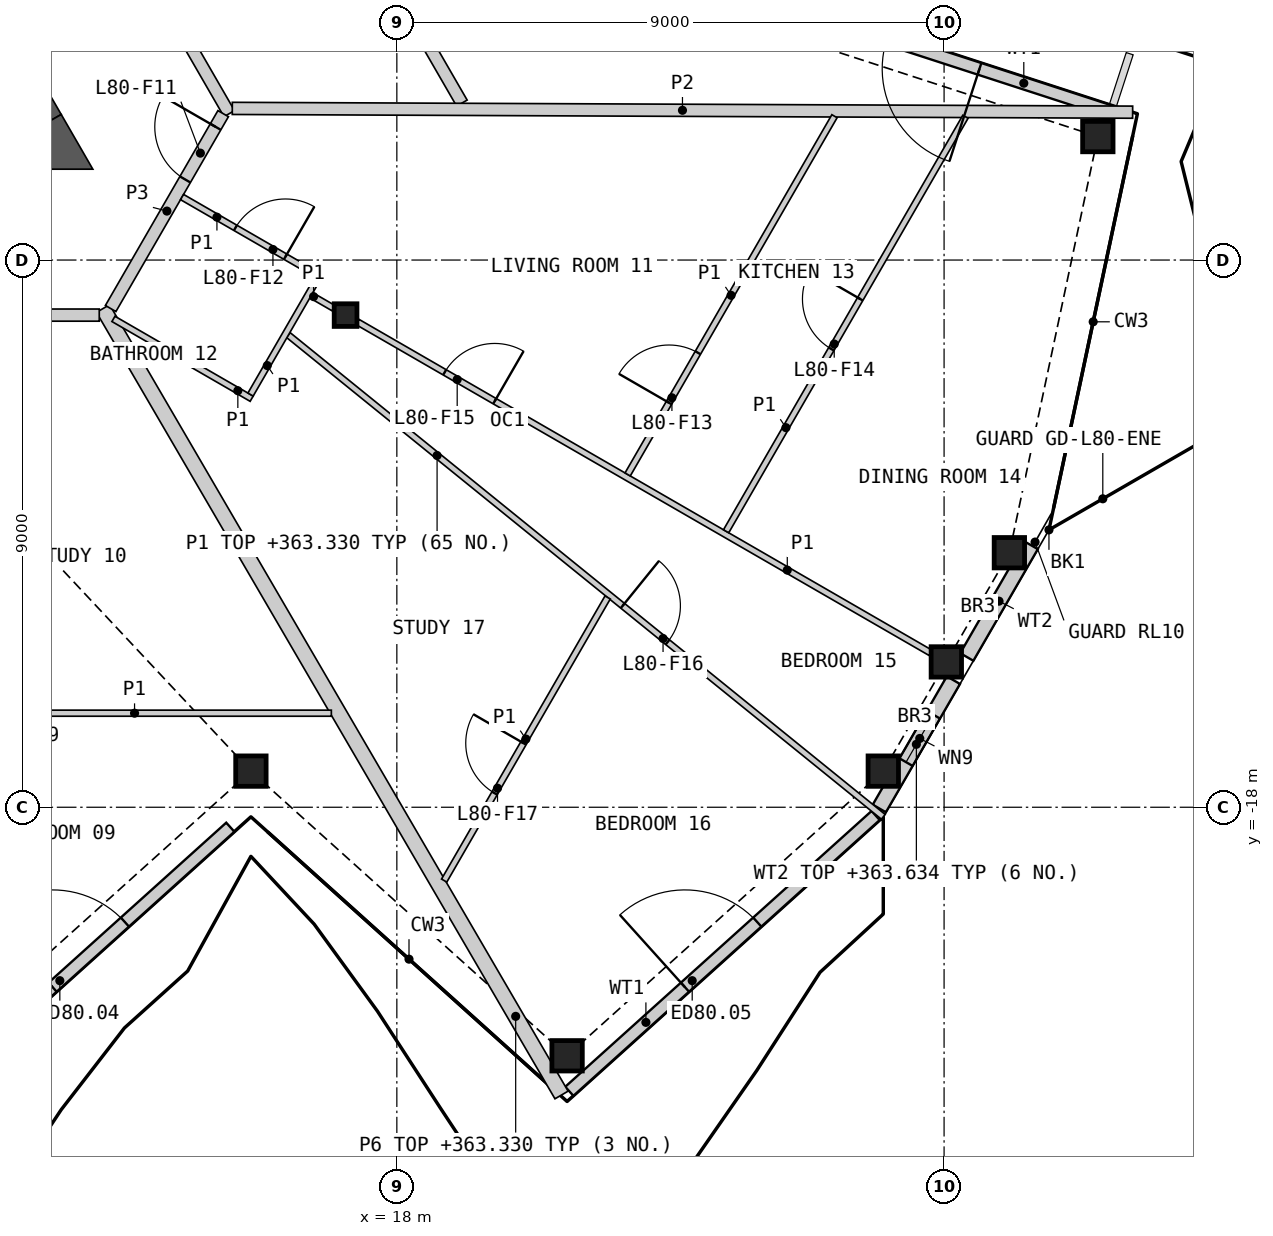
"""IFC4 building model, lengths in metres.
Left out: names, types, materials, properties, quantities, classifications, styles, units other than length and angle.
Written with IfcOpenShell. Run it as: python <this file> out.ifc"""

import sys

from ifc_helpers import new_model, si_unit, direction, frame, frame_2d, origin, origin_2d, place, context, subcontext, project, spatial, polyline, rectangle, hollow_rectangle, i_section, outline, extrude, element, fill, save


model = new_model("IFC4")
c1 = context("Model", 3, precision=1e-05, world=origin(), true_north=direction((0.0, 1.0)))
c2 = subcontext(c1, "Body", "Model", "MODEL_VIEW")
j1 = project(units=[si_unit("LENGTHUNIT", "METRE"), si_unit("PLANEANGLEUNIT", "RADIAN")], contexts=[c1])
p1 = place(None, origin())
s1 = spatial("IfcSite", under=j1, at=p1, CompositionType="ELEMENT")
p2 = place(p1, origin())
s2 = spatial("IfcBuilding", under=s1, at=p2, CompositionType="ELEMENT")
p3 = place(p2, frame((0.0, 0.0, 361.0)))
s3 = spatial("IfcBuildingStorey", under=s2, at=p3, CompositionType="ELEMENT", Elevation=361.0)
for number, where, z_axis, x_axis in (
    (1, (15.6, -17.406, 0.0), (0.0, 0.0, 1.0), (1.0, 0.0, 0.0)),
    (2, (20.8, -22.088, 0.0), (0.0, 0.0, 1.0), (1.0, 0.0, 0.0)),
    (3, (26.0, -17.406, 0.0), (0.0, 0.0, 1.0), (1.0, 0.0, 0.0)),
    (4, (27.037, -15.61, 0.0), (0.0, 0.0, 1.0), (1.0, 0.0, 0.0)),
    (5, (28.074, -13.814, 0.0), (0.0, 0.0, 1.0), (1.0, 0.0, 0.0)),
    (6, (29.529, -6.969, 0.0), (0.0, 0.0, 1.0), (1.0, 0.0, 0.0)),
):
    element("IfcColumn", number, at=place(p3, frame(where, z_axis=z_axis, x_axis=x_axis)), inside=s3, PredefinedType="COLUMN", context=c2, shape_type="SweptSolid", body=[
        extrude(hollow_rectangle(XDim=0.5, YDim=0.5, WallThickness=0.03, at=origin_2d()), origin(), (0.0, 0.0, 1.0), 3.4),
    ])
p4 = place(p3, frame((17.157, -9.906, 0.0), z_axis=(0.0, 0.0, 1.0), x_axis=(1.0, 0.0, 0.0)))
e7 = element("IfcColumn", 7, at=p4, inside=s3, PredefinedType="COLUMN", context=c2, shape_type="SweptSolid", body=[
    extrude(i_section(OverallWidth=0.374, OverallDepth=0.372, WebThickness=0.016, FlangeThickness=0.026, at=origin_2d()), origin(), (0.0, 0.0, 1.0), 3.4),
])
p5 = place(p3, frame((10.503, -22.612, 0.0), z_axis=(0.0, 0.0, 1.0), x_axis=(0.743148117717, 0.669126949939, 0.0)))
e8 = element("IfcWall", 8, at=p5, inside=s3, PredefinedType="SOLIDWALL", context=c2, shape_type="SweptSolid", body=[
    extrude(rectangle(XDim=6.402, YDim=0.2, at=frame_2d((3.201, 0.0))), origin(), (0.0, 0.0, 1.0), 2.634),
])
p6 = place(p5, frame((2.469, 0.0, 0.0)))
e9 = element("IfcOpeningElement", 9, at=p6, cuts=e8, PredefinedType="OPENING", context=c2, shape_type="SweptSolid", body=[
    extrude(rectangle(XDim=1.6, YDim=2.25, at=frame_2d((0.8, 1.125))), frame((0.0, 0.11, 0.0), z_axis=(0.0, -1.0, 0.0), x_axis=(1.0, 0.0, 0.0)), (0.0, 0.0, 1.0), 0.22),
])
p7 = place(p3, frame((20.837, -22.672, 0.0), z_axis=(0.0, 0.0, 1.0), x_axis=(0.743143698099, 0.669131858437, 0.0)))
e10 = element("IfcWall", 10, at=p7, inside=s3, PredefinedType="SOLIDWALL", context=c2, shape_type="SweptSolid", body=[
    extrude(rectangle(XDim=6.779, YDim=0.2, at=frame_2d((3.389, 0.0))), origin(), (0.0, 0.0, 1.0), 2.634),
])
p8 = place(p7, frame((2.559, 0.0, 0.0)))
e11 = element("IfcOpeningElement", 11, at=p8, cuts=e10, PredefinedType="OPENING", context=c2, shape_type="SweptSolid", body=[
    extrude(rectangle(XDim=1.6, YDim=2.25, at=frame_2d((0.8, 1.125))), frame((0.0, 0.11, 0.0), z_axis=(0.0, -1.0, 0.0), x_axis=(1.0, 0.0, 0.0)), (0.0, 0.0, 1.0), 0.22),
])
p9 = place(p3, frame((25.935, -18.02, 0.0), z_axis=(0.0, 0.0, 1.0), x_axis=(0.500028873844, 0.866008732821, 0.0)))
e12 = element("IfcWall", 12, at=p9, inside=s3, PredefinedType="SOLIDWALL", context=c2, shape_type="SweptSolid", body=[
    extrude(rectangle(XDim=2.437, YDim=0.25, at=frame_2d((1.218, 0.0))), origin(), (0.0, 0.0, 1.0), 2.634),
])
p10 = place(p9, frame((0.88, 0.0, 0.6)))
e13 = element("IfcOpeningElement", 13, at=p10, cuts=e12, PredefinedType="OPENING", context=c2, shape_type="SweptSolid", body=[
    extrude(rectangle(XDim=0.9, YDim=1.8, at=frame_2d((0.45, 0.9))), frame((0.0, 0.135, 0.0), z_axis=(0.0, -1.0, 0.0), x_axis=(1.0, 0.0, 0.0)), (0.0, 0.0, 1.0), 0.27),
])
p11 = place(p3, frame((27.374, -15.528, 0.0), z_axis=(0.0, 0.0, 1.0), x_axis=(0.499941779639, 0.866059014716, 0.0)))
e14 = element("IfcWall", 14, at=p11, inside=s3, PredefinedType="SOLIDWALL", context=c2, shape_type="SweptSolid", body=[
    extrude(rectangle(XDim=2.12, YDim=0.25, at=frame_2d((1.06, 0.0))), origin(), (0.0, 0.0, 1.0), 2.634),
])
p12 = place(p3, frame((29.801, -6.576, 0.0), z_axis=(0.0, 0.0, 1.0), x_axis=(-0.951060123915, 0.309005891041, 0.0)))
e15 = element("IfcWall", 15, at=p12, inside=s3, PredefinedType="SOLIDWALL", context=c2, shape_type="SweptSolid", body=[
    extrude(rectangle(XDim=6.265, YDim=0.2, at=frame_2d((3.133, 0.0))), origin(), (0.0, 0.0, 1.0), 2.634),
])
p13 = place(p12, frame((2.333, 0.0, 0.0)))
e16 = element("IfcOpeningElement", 16, at=p13, cuts=e15, PredefinedType="OPENING", context=c2, shape_type="SweptSolid", body=[
    extrude(rectangle(XDim=1.6, YDim=2.25, at=frame_2d((0.8, 1.125))), frame((0.0, 0.11, 0.0), z_axis=(0.0, -1.0, 0.0), x_axis=(1.0, 0.0, 0.0)), (0.0, 0.0, 1.0), 0.22),
])
p14 = place(p3, frame((12.221, -6.756, 0.0), z_axis=(0.0, 0.0, 1.0), x_axis=(-0.50000604952, 0.866021911064, 0.0)))
e17 = element("IfcWall", 17, at=p14, inside=s3, PredefinedType="SHEAR", context=c2, shape_type="SweptSolid", body=[
    extrude(rectangle(XDim=4.869, YDim=0.6, at=frame_2d((2.434, 0.0))), origin(), (0.0, 0.0, 1.0), 3.1),
])
p15 = place(p3, origin())
e18 = element("IfcWall", 18, at=p15, inside=s3, PredefinedType="SHEAR", context=c2, shape_type="SweptSolid", body=[
    extrude(outline(polyline([(11.961, -7.506), (11.961, -6.906), (12.48, -6.606), (13.0, -7.506), (11.961, -7.506)])), origin(), (0.0, 0.0, 1.0), 3.1),
])
p16 = place(p3, frame((13.168, -9.798, 0.0), z_axis=(0.0, 0.0, 1.0), x_axis=(0.503632750219, -0.863917850786, 0.0)))
e19 = element("IfcWall", 19, at=p16, inside=s3, PredefinedType="PARTITIONING", context=c2, shape_type="SweptSolid", body=[
    extrude(rectangle(XDim=14.972, YDim=0.25, at=frame_2d((7.486, 0.0))), origin(), (0.0, 0.0, 1.0), 2.33),
])
p17 = place(p3, frame((8.775, -9.906, 0.0), z_axis=(0.0, 0.0, 1.0), x_axis=(1.0, 0.0, 0.0)))
e20 = element("IfcWall", 20, at=p17, inside=s3, PredefinedType="PARTITIONING", context=c2, shape_type="SweptSolid", body=[
    extrude(rectangle(XDim=4.331, YDim=0.2, at=frame_2d((2.165, 0.0))), origin(), (0.0, 0.0, 1.0), 3.1),
])
p18 = place(p3, frame((12.981, -2.673, 0.0), z_axis=(0.0, 0.0, 1.0), x_axis=(0.499974648164, -0.866040040179, 0.0)))
e21 = element("IfcWall", 21, at=p18, inside=s3, PredefinedType="PARTITIONING", context=c2, shape_type="SweptSolid", body=[
    extrude(rectangle(XDim=4.525, YDim=0.2, at=frame_2d((2.263, 0.0))), origin(), (0.0, 0.0, 1.0), 3.1),
])
p19 = place(p3, frame((13.293, -9.797, 0.0), z_axis=(0.0, 0.0, 1.0), x_axis=(0.499977520935, 0.86603838169, 0.0)))
e22 = element("IfcWall", 22, at=p19, inside=s3, PredefinedType="PARTITIONING", context=c2, shape_type="SweptSolid", body=[
    extrude(rectangle(XDim=3.701, YDim=0.2, at=frame_2d((1.851, 0.0))), origin(), (0.0, 0.0, 1.0), 3.1),
])
p20 = place(p19, frame((2.451, 0.0, 0.0)))
e23 = element("IfcOpeningElement", 23, at=p20, cuts=e22, PredefinedType="OPENING", context=c2, shape_type="SweptSolid", body=[
    extrude(rectangle(XDim=1.0, YDim=2.1, at=frame_2d((0.5, 1.05))), frame((0.0, 0.11, 0.0), z_axis=(0.0, -1.0, 0.0), x_axis=(1.0, 0.0, 0.0)), (0.0, 0.0, 1.0), 0.22),
])
p21 = place(p3, frame((11.573, 6.566, 0.0), z_axis=(0.0, 0.0, 1.0), x_axis=(0.499993542657, -0.866029131901, 0.0)))
e24 = element("IfcWall", 24, at=p21, inside=s3, PredefinedType="PARTITIONING", context=c2, shape_type="SweptSolid", body=[
    extrude(rectangle(XDim=14.994, YDim=0.2, at=frame_2d((7.497, 0.0))), origin(), (0.0, 0.0, 1.0), 2.33),
])
p22 = place(p21, frame((5.166, 0.0, 0.0)))
e25 = element("IfcOpeningElement", 25, at=p22, cuts=e24, PredefinedType="OPENING", context=c2, shape_type="SweptSolid", body=[
    extrude(rectangle(XDim=0.95, YDim=2.1, at=frame_2d((0.475, 1.05))), frame((0.0, 0.11, 0.0), z_axis=(0.0, -1.0, 0.0), x_axis=(1.0, 0.0, 0.0)), (0.0, 0.0, 1.0), 0.22),
])
p23 = place(p3, frame((15.294, -6.506, 0.0), z_axis=(0.0, 0.0, 1.0), x_axis=(0.99999116141, -0.004204414611, 0.0)))
e26 = element("IfcWall", 26, at=p23, inside=s3, PredefinedType="PARTITIONING", context=c2, shape_type="SweptSolid", body=[
    extrude(rectangle(XDim=14.807, YDim=0.2, at=frame_2d((7.404, 0.0))), origin(), (0.0, 0.0, 1.0), 2.33),
])
p24 = place(p3, frame((16.216, -10.234, 0.0), z_axis=(0.0, 0.0, 1.0), x_axis=(0.777145059662, -0.629321504672, 0.0)))
e27 = element("IfcWall", 27, at=p24, inside=s3, PredefinedType="PARTITIONING", context=c2, shape_type="SweptSolid", body=[
    extrude(rectangle(XDim=12.59, YDim=0.1, at=frame_2d((6.295, 0.0))), origin(), (0.0, 0.0, 1.0), 2.33),
])
p25 = place(p24, frame((7.074, 0.0, 0.0)))
e28 = element("IfcOpeningElement", 28, at=p25, cuts=e27, PredefinedType="OPENING", context=c2, shape_type="SweptSolid", body=[
    extrude(rectangle(XDim=0.95, YDim=2.1, at=frame_2d((0.475, 1.05))), frame((0.0, 0.06, 0.0), z_axis=(0.0, -1.0, 0.0), x_axis=(1.0, 0.0, 0.0)), (0.0, 0.0, 1.0), 0.12),
])
p26 = place(p3, frame((17.354, -10.019, 0.0), z_axis=(0.0, 0.0, 1.0), x_axis=(0.866019680922, -0.500009912158, 0.0)))
e29 = element("IfcWall", 29, at=p26, inside=s3, PredefinedType="PARTITIONING", context=c2, shape_type="SweptSolid", body=[
    extrude(rectangle(XDim=10.881, YDim=0.1, at=frame_2d((5.44, 0.0))), origin(), (0.0, 0.0, 1.0), 2.33),
])
p27 = place(p26, frame((1.655, 0.0, 0.0)))
e30 = element("IfcOpeningElement", 30, at=p27, cuts=e29, PredefinedType="OPENING", context=c2, shape_type="SweptSolid", body=[
    extrude(rectangle(XDim=0.95, YDim=2.1, at=frame_2d((0.475, 1.05))), frame((0.0, 0.06, 0.0), z_axis=(0.0, -1.0, 0.0), x_axis=(1.0, 0.0, 0.0)), (0.0, 0.0, 1.0), 0.12),
])
p28 = place(p3, frame((23.415, -13.461, 0.0), z_axis=(0.0, 0.0, 1.0), x_axis=(0.500011483804, 0.866018773506, 0.0)))
e31 = element("IfcWall", 31, at=p28, inside=s3, PredefinedType="PARTITIONING", context=c2, shape_type="SweptSolid", body=[
    extrude(rectangle(XDim=7.872, YDim=0.1, at=frame_2d((3.936, 0.0))), origin(), (0.0, 0.0, 1.0), 2.33),
])
p29 = place(p28, frame((3.461, 0.0, 0.0)))
e32 = element("IfcOpeningElement", 32, at=p29, cuts=e31, PredefinedType="OPENING", context=c2, shape_type="SweptSolid", body=[
    extrude(rectangle(XDim=0.95, YDim=2.1, at=frame_2d((0.475, 1.05))), frame((0.0, 0.06, 0.0), z_axis=(0.0, -1.0, 0.0), x_axis=(1.0, 0.0, 0.0)), (0.0, 0.0, 1.0), 0.12),
])
p30 = place(p3, frame((21.796, -12.526, 0.0), z_axis=(0.0, 0.0, 1.0), x_axis=(0.499994777381, 0.866028419044, 0.0)))
e33 = element("IfcWall", 33, at=p30, inside=s3, PredefinedType="PARTITIONING", context=c2, shape_type="SweptSolid", body=[
    extrude(rectangle(XDim=6.803, YDim=0.1, at=frame_2d((3.402, 0.0))), origin(), (0.0, 0.0, 1.0), 2.33),
])
p31 = place(p30, frame((1.361, 0.0, 0.0)))
e34 = element("IfcOpeningElement", 34, at=p31, cuts=e33, PredefinedType="OPENING", context=c2, shape_type="SweptSolid", body=[
    extrude(rectangle(XDim=0.95, YDim=2.1, at=frame_2d((0.475, 1.05))), frame((0.0, 0.06, 0.0), z_axis=(0.0, -1.0, 0.0), x_axis=(1.0, 0.0, 0.0)), (0.0, 0.0, 1.0), 0.12),
])
p32 = place(p3, frame((10.45, -16.453, 0.0), z_axis=(0.0, 0.0, 1.0), x_axis=(1.0, 0.0, 0.0)))
e35 = element("IfcWall", 35, at=p32, inside=s3, PredefinedType="PARTITIONING", context=c2, shape_type="SweptSolid", body=[
    extrude(rectangle(XDim=6.473, YDim=0.1, at=frame_2d((3.236, 0.0))), origin(), (0.0, 0.0, 1.0), 2.33),
])
p33 = place(p32, frame((0.853, 0.0, 0.0)))
e36 = element("IfcOpeningElement", 36, at=p33, cuts=e35, PredefinedType="OPENING", context=c2, shape_type="SweptSolid", body=[
    extrude(rectangle(XDim=0.95, YDim=2.1, at=frame_2d((0.475, 1.05))), frame((0.0, 0.06, 0.0), z_axis=(0.0, -1.0, 0.0), x_axis=(1.0, 0.0, 0.0)), (0.0, 0.0, 1.0), 0.12),
])
p34 = place(p3, frame((18.778, -19.206, 0.0), z_axis=(0.0, 0.0, 1.0), x_axis=(0.499992359988, 0.866029814703, 0.0)))
e37 = element("IfcWall", 37, at=p34, inside=s3, PredefinedType="PARTITIONING", context=c2, shape_type="SweptSolid", body=[
    extrude(rectangle(XDim=5.376, YDim=0.1, at=frame_2d((2.688, 0.0))), origin(), (0.0, 0.0, 1.0), 2.33),
])
p35 = place(p34, frame((1.659, 0.0, 0.0)))
e38 = element("IfcOpeningElement", 38, at=p35, cuts=e37, PredefinedType="OPENING", context=c2, shape_type="SweptSolid", body=[
    extrude(rectangle(XDim=0.95, YDim=2.1, at=frame_2d((0.475, 1.05))), frame((0.0, 0.06, 0.0), z_axis=(0.0, -1.0, 0.0), x_axis=(1.0, 0.0, 0.0)), (0.0, 0.0, 1.0), 0.12),
])
p36 = place(p3, frame((14.467, -7.964, 0.0), z_axis=(0.0, 0.0, 1.0), x_axis=(0.86601223543, -0.500022807565, 0.0)))
e39 = element("IfcWall", 39, at=p36, inside=s3, PredefinedType="PARTITIONING", context=c2, shape_type="SweptSolid", body=[
    extrude(rectangle(XDim=2.65, YDim=0.1, at=frame_2d((1.325, 0.0))), origin(), (0.0, 0.0, 1.0), 2.33),
])
p37 = place(p36, frame((1.014, 0.0, 0.0)))
e40 = element("IfcOpeningElement", 40, at=p37, cuts=e39, PredefinedType="OPENING", context=c2, shape_type="SweptSolid", body=[
    extrude(rectangle(XDim=0.95, YDim=2.1, at=frame_2d((0.475, 1.05))), frame((0.0, 0.06, 0.0), z_axis=(0.0, -1.0, 0.0), x_axis=(1.0, 0.0, 0.0)), (0.0, 0.0, 1.0), 0.12),
])
p38 = place(p3, frame((13.339, -9.968, 0.0), z_axis=(0.0, 0.0, 1.0), x_axis=(0.866013657776, -0.500020344131, 0.0)))
e41 = element("IfcWall", 41, at=p38, inside=s3, PredefinedType="PARTITIONING", context=c2, shape_type="SweptSolid", body=[
    extrude(rectangle(XDim=2.625, YDim=0.1, at=frame_2d((1.312, 0.0))), origin(), (0.0, 0.0, 1.0), 2.33),
])
p39 = place(p3, frame((15.594, -11.212, 0.0), z_axis=(0.0, 0.0, 1.0), x_axis=(0.499981787252, 0.866035918664, 0.0)))
e42 = element("IfcWall", 42, at=p39, inside=s3, PredefinedType="PARTITIONING", context=c2, shape_type="SweptSolid", body=[
    extrude(rectangle(XDim=2.2, YDim=0.1, at=frame_2d((1.1, 0.0))), origin(), (0.0, 0.0, 1.0), 2.33),
])
p40 = place(p3, frame((16.594, -9.581, 0.0), z_axis=(0.0, 0.0, 1.0), x_axis=(0.866137484628, -0.499805820016, 0.0)))
e43 = element("IfcWall", 43, at=p40, inside=s3, PredefinedType="PARTITIONING", context=c2, shape_type="SweptSolid", body=[
    extrude(rectangle(XDim=0.423, YDim=0.1, at=frame_2d((0.211, 0.0))), origin(), (0.0, 0.0, 1.0), 2.33),
])
p41 = place(p6, origin())
e44 = element("IfcDoor", 44, at=p41, inside=s3, OperationType="DOUBLE_DOOR_SINGLE_SWING", PredefinedType="DOOR", context=c2, shape_type="SweptSolid", body=[
    extrude(rectangle(XDim=1.6, YDim=2.25, at=frame_2d((0.8, 1.125))), frame((0.0, 0.025, 0.0), z_axis=(0.0, -1.0, 0.0), x_axis=(1.0, 0.0, 0.0)), (0.0, 0.0, 1.0), 0.05),
])
fill(e9, e44)
p42 = place(p8, origin())
e45 = element("IfcDoor", 45, at=p42, inside=s3, OperationType="DOUBLE_DOOR_SINGLE_SWING", PredefinedType="DOOR", context=c2, shape_type="SweptSolid", body=[
    extrude(rectangle(XDim=1.6, YDim=2.25, at=frame_2d((0.8, 1.125))), frame((0.0, 0.025, 0.0), z_axis=(0.0, -1.0, 0.0), x_axis=(1.0, 0.0, 0.0)), (0.0, 0.0, 1.0), 0.05),
])
fill(e11, e45)
p43 = place(p10, origin())
e46 = element("IfcWindow", 46, at=p43, inside=s3, PartitioningType="SINGLE_PANEL", PredefinedType="WINDOW", context=c2, shape_type="SweptSolid", body=[
    extrude(rectangle(XDim=0.9, YDim=1.8, at=frame_2d((0.45, 0.9))), frame((0.0, 0.03, 0.0), z_axis=(0.0, -1.0, 0.0), x_axis=(1.0, 0.0, 0.0)), (0.0, 0.0, 1.0), 0.06),
])
fill(e13, e46)
p44 = place(p13, origin())
e47 = element("IfcDoor", 47, at=p44, inside=s3, OperationType="DOUBLE_DOOR_SINGLE_SWING", PredefinedType="DOOR", context=c2, shape_type="SweptSolid", body=[
    extrude(rectangle(XDim=1.6, YDim=2.25, at=frame_2d((0.8, 1.125))), frame((0.0, 0.025, 0.0), z_axis=(0.0, -1.0, 0.0), x_axis=(1.0, 0.0, 0.0)), (0.0, 0.0, 1.0), 0.05),
])
fill(e16, e47)
p45 = place(p20, origin())
e48 = element("IfcDoor", 48, at=p45, inside=s3, OperationType="SINGLE_SWING_RIGHT", PredefinedType="DOOR", context=c2, shape_type="SweptSolid", body=[
    extrude(rectangle(XDim=1.0, YDim=2.1, at=frame_2d((0.5, 1.05))), frame((0.0, 0.025, 0.0), z_axis=(0.0, -1.0, 0.0), x_axis=(1.0, 0.0, 0.0)), (0.0, 0.0, 1.0), 0.05),
])
fill(e23, e48)
p46 = place(p37, origin())
e49 = element("IfcDoor", 49, at=p46, inside=s3, OperationType="SINGLE_SWING_RIGHT", PredefinedType="DOOR", context=c2, shape_type="SweptSolid", body=[
    extrude(rectangle(XDim=0.95, YDim=2.1, at=frame_2d((0.475, 1.05))), frame((0.0, 0.025, 0.0), z_axis=(0.0, -1.0, 0.0), x_axis=(1.0, 0.0, 0.0)), (0.0, 0.0, 1.0), 0.05),
])
fill(e40, e49)
p47 = place(p31, origin())
e50 = element("IfcDoor", 50, at=p47, inside=s3, OperationType="SINGLE_SWING_LEFT", PredefinedType="DOOR", context=c2, shape_type="SweptSolid", body=[
    extrude(rectangle(XDim=0.95, YDim=2.1, at=frame_2d((0.475, 1.05))), frame((0.0, 0.025, 0.0), z_axis=(0.0, -1.0, 0.0), x_axis=(1.0, 0.0, 0.0)), (0.0, 0.0, 1.0), 0.05),
])
fill(e34, e50)
p48 = place(p29, origin())
e51 = element("IfcDoor", 51, at=p48, inside=s3, OperationType="SINGLE_SWING_RIGHT", PredefinedType="DOOR", context=c2, shape_type="SweptSolid", body=[
    extrude(rectangle(XDim=0.95, YDim=2.1, at=frame_2d((0.475, 1.05))), frame((0.0, 0.025, 0.0), z_axis=(0.0, -1.0, 0.0), x_axis=(1.0, 0.0, 0.0)), (0.0, 0.0, 1.0), 0.05),
])
fill(e32, e51)
p49 = place(p27, origin())
e52 = element("IfcDoor", 52, at=p49, inside=s3, OperationType="SINGLE_SWING_RIGHT", PredefinedType="DOOR", context=c2, shape_type="SweptSolid", body=[
    extrude(rectangle(XDim=0.95, YDim=2.1, at=frame_2d((0.475, 1.05))), frame((0.0, 0.025, 0.0), z_axis=(0.0, -1.0, 0.0), x_axis=(1.0, 0.0, 0.0)), (0.0, 0.0, 1.0), 0.05),
])
fill(e30, e52)
p50 = place(p25, origin())
e53 = element("IfcDoor", 53, at=p50, inside=s3, OperationType="SINGLE_SWING_LEFT", PredefinedType="DOOR", context=c2, shape_type="SweptSolid", body=[
    extrude(rectangle(XDim=0.95, YDim=2.1, at=frame_2d((0.475, 1.05))), frame((0.0, 0.025, 0.0), z_axis=(0.0, -1.0, 0.0), x_axis=(1.0, 0.0, 0.0)), (0.0, 0.0, 1.0), 0.05),
])
fill(e28, e53)
p51 = place(p35, origin())
e54 = element("IfcDoor", 54, at=p51, inside=s3, OperationType="SINGLE_SWING_RIGHT", PredefinedType="DOOR", context=c2, shape_type="SweptSolid", body=[
    extrude(rectangle(XDim=0.95, YDim=2.1, at=frame_2d((0.475, 1.05))), frame((0.0, 0.025, 0.0), z_axis=(0.0, -1.0, 0.0), x_axis=(1.0, 0.0, 0.0)), (0.0, 0.0, 1.0), 0.05),
])
fill(e38, e54)
save(model, sys.argv[1])
